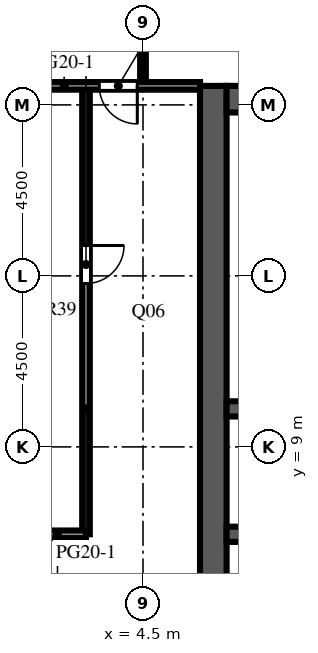
"""IFC4 building model, lengths in metres.
Left out: names, types, materials, properties, quantities, classifications, styles, units other than length and angle.
Written with IfcOpenShell. Run it as: python <this file> out.ifc"""

import sys

from ifc_helpers import new_model, si_unit, direction, frame, frame_2d, origin, place, context, subcontext, project, spatial, rectangle, extrude, element, fill, save


model = new_model("IFC4")
c1 = context("Model", 3, precision=1e-05, world=origin(), true_north=direction((0.0, 1.0)))
c2 = subcontext(c1, "Body", "Model", "MODEL_VIEW")
j1 = project(units=[si_unit("LENGTHUNIT", "METRE"), si_unit("PLANEANGLEUNIT", "RADIAN")], contexts=[c1])
p1 = place(None, origin())
s1 = spatial("IfcSite", under=j1, at=p1, CompositionType="ELEMENT")
p2 = place(p1, origin())
s2 = spatial("IfcBuilding", under=s1, at=p2, CompositionType="ELEMENT")
p3 = place(p2, frame((0.0, 0.0, 239.8)))
s3 = spatial("IfcBuildingStorey", under=s2, at=p3, CompositionType="ELEMENT", Elevation=239.8)
p4 = place(p3, frame((6.35, -9.0, 0.0), z_axis=(0.0, 0.0, 1.0), x_axis=(0.0, 1.0, 0.0)))
e1 = element("IfcWall", 1, at=p4, inside=s3, PredefinedType="SHEAR", context=c2, shape_type="SweptSolid", body=[
    extrude(rectangle(XDim=27.5, YDim=0.7, at=frame_2d((13.75, 0.0))), origin(), (0.0, 0.0, 1.0), 4.1),
])
p5 = place(p4, frame((12.55, 0.0, 0.0)))
e2 = element("IfcOpeningElement", 2, at=p5, cuts=e1, PredefinedType="OPENING", context=c2, shape_type="SweptSolid", body=[
    extrude(rectangle(XDim=2.4, YDim=2.4, at=frame_2d((1.2, 1.2))), frame((0.0, 0.36, 0.0), z_axis=(0.0, -1.0, 0.0), x_axis=(1.0, 0.0, 0.0)), (0.0, 0.0, 1.0), 0.72),
])
p6 = place(p4, frame((5.42, 0.0, 0.0)))
e3 = element("IfcOpeningElement", 3, at=p6, cuts=e1, PredefinedType="OPENING", context=c2, shape_type="SweptSolid", body=[
    extrude(rectangle(XDim=1.2, YDim=2.1, at=frame_2d((0.6, 1.05))), frame((0.0, 0.36, 0.0), z_axis=(0.0, -1.0, 0.0), x_axis=(1.0, 0.0, 0.0)), (0.0, 0.0, 1.0), 0.72),
])
p7 = place(p4, frame((19.46, 0.0, 0.0)))
e4 = element("IfcOpeningElement", 4, at=p7, cuts=e1, PredefinedType="OPENING", context=c2, shape_type="SweptSolid", body=[
    extrude(rectangle(XDim=1.0, YDim=2.1, at=frame_2d((0.5, 1.05))), frame((0.0, 0.36, 0.0), z_axis=(0.0, -1.0, 0.0), x_axis=(1.0, 0.0, 0.0)), (0.0, 0.0, 1.0), 0.72),
])
p8 = place(p4, frame((21.17, 0.0, 0.0)))
e5 = element("IfcOpeningElement", 5, at=p8, cuts=e1, PredefinedType="OPENING", context=c2, shape_type="SweptSolid", body=[
    extrude(rectangle(XDim=1.0, YDim=2.1, at=frame_2d((0.5, 1.05))), frame((0.0, 0.36, 0.0), z_axis=(0.0, -1.0, 0.0), x_axis=(1.0, 0.0, 0.0)), (0.0, 0.0, 1.0), 0.72),
])
p9 = place(p4, frame((23.26, 0.0, 0.0)))
e6 = element("IfcOpeningElement", 6, at=p9, cuts=e1, PredefinedType="OPENING", context=c2, shape_type="SweptSolid", body=[
    extrude(rectangle(XDim=1.0, YDim=2.1, at=frame_2d((0.5, 1.05))), frame((0.0, 0.36, 0.0), z_axis=(0.0, -1.0, 0.0), x_axis=(1.0, 0.0, 0.0)), (0.0, 0.0, 1.0), 0.72),
])
p10 = place(p4, frame((25.35, 0.0, 0.0)))
e7 = element("IfcOpeningElement", 7, at=p10, cuts=e1, PredefinedType="OPENING", context=c2, shape_type="SweptSolid", body=[
    extrude(rectangle(XDim=1.0, YDim=2.1, at=frame_2d((0.5, 1.05))), frame((0.0, 0.36, 0.0), z_axis=(0.0, -1.0, 0.0), x_axis=(1.0, 0.0, 0.0)), (0.0, 0.0, 1.0), 0.72),
])
p11 = place(p3, frame((6.7, 18.15, 0.0), z_axis=(0.0, 0.0, 1.0), x_axis=(1.0, 0.0, 0.0)))
e8 = element("IfcWall", 8, at=p11, inside=s3, PredefinedType="SHEAR", context=c2, shape_type="SweptSolid", body=[
    extrude(rectangle(XDim=10.6, YDim=0.7, at=frame_2d((5.3, 0.0))), origin(), (0.0, 0.0, 1.0), 4.1),
])
p12 = place(p3, frame((6.7, 6.7, 0.0), z_axis=(0.0, 0.0, 1.0), x_axis=(1.0, 0.0, 0.0)))
e9 = element("IfcWall", 9, at=p12, inside=s3, PredefinedType="SHEAR", context=c2, shape_type="SweptSolid", body=[
    extrude(rectangle(XDim=10.6, YDim=0.4, at=frame_2d((5.3, 0.0))), origin(), (0.0, 0.0, 1.0), 4.1),
])
p13 = place(p12, frame((3.438, 0.0, 0.0)))
e10 = element("IfcOpeningElement", 10, at=p13, cuts=e9, PredefinedType="OPENING", context=c2, shape_type="SweptSolid", body=[
    extrude(rectangle(XDim=1.1, YDim=2.1, at=frame_2d((0.55, 1.05))), frame((0.0, 0.21, 0.0), z_axis=(0.0, -1.0, 0.0), x_axis=(1.0, 0.0, 0.0)), (0.0, 0.0, 1.0), 0.42),
])
p14 = place(p12, frame((6.062, 0.0, 0.0)))
e11 = element("IfcOpeningElement", 11, at=p14, cuts=e9, PredefinedType="OPENING", context=c2, shape_type="SweptSolid", body=[
    extrude(rectangle(XDim=1.1, YDim=2.1, at=frame_2d((0.55, 1.05))), frame((0.0, 0.21, 0.0), z_axis=(0.0, -1.0, 0.0), x_axis=(1.0, 0.0, 0.0)), (0.0, 0.0, 1.0), 0.42),
])
p15 = place(p12, frame((8.812, 0.0, 0.0)))
e12 = element("IfcOpeningElement", 12, at=p15, cuts=e9, PredefinedType="OPENING", context=c2, shape_type="SweptSolid", body=[
    extrude(rectangle(XDim=1.1, YDim=2.1, at=frame_2d((0.55, 1.05))), frame((0.0, 0.21, 0.0), z_axis=(0.0, -1.0, 0.0), x_axis=(1.0, 0.0, 0.0)), (0.0, 0.0, 1.0), 0.42),
])
p16 = place(p12, frame((0.738, 0.0, 0.0)))
e13 = element("IfcOpeningElement", 13, at=p16, cuts=e9, PredefinedType="OPENING", context=c2, shape_type="SweptSolid", body=[
    extrude(rectangle(XDim=1.0, YDim=2.1, at=frame_2d((0.5, 1.05))), frame((0.0, 0.21, 0.0), z_axis=(0.0, -1.0, 0.0), x_axis=(1.0, 0.0, 0.0)), (0.0, 0.0, 1.0), 0.42),
])
p17 = place(p3, frame((6.7, 10.0, 0.0), z_axis=(0.0, 0.0, 1.0), x_axis=(1.0, 0.0, 0.0)))
e14 = element("IfcWall", 14, at=p17, inside=s3, PredefinedType="SHEAR", context=c2, shape_type="SweptSolid", body=[
    extrude(rectangle(XDim=10.6, YDim=0.4, at=frame_2d((5.3, 0.0))), origin(), (0.0, 0.0, 1.0), 4.1),
])
for number, where, z_axis, x_axis in (
    (15, (6.7, 11.72, 0.0), (0.0, 0.0, 1.0), (1.0, 0.0, 0.0)),
    (16, (6.7, 13.62, 0.0), (0.0, 0.0, 1.0), (1.0, 0.0, 0.0)),
    (17, (6.7, 15.9, 0.0), (0.0, 0.0, 1.0), (1.0, 0.0, 0.0)),
):
    element("IfcWall", number, at=place(p3, frame(where, z_axis=z_axis, x_axis=x_axis)), inside=s3, PredefinedType="PARTITIONING", context=c2, shape_type="SweptSolid", body=[
        extrude(rectangle(XDim=5.1, YDim=0.1, at=frame_2d((2.55, 0.0))), origin(), (0.0, 0.0, 1.0), 3.65),
    ])
p18 = place(p3, frame((3.0, 6.7, 0.0), z_axis=(0.0, 0.0, 1.0), x_axis=(0.0, 1.0, 0.0)))
e18 = element("IfcWall", 18, at=p18, inside=s3, PredefinedType="PARTITIONING", context=c2, shape_type="SweptSolid", body=[
    extrude(rectangle(XDim=11.8, YDim=0.2, at=frame_2d((5.9, 0.0))), origin(), (0.0, 0.0, 1.0), 3.65),
])
p19 = place(p18, frame((6.6, 0.0, 0.0)))
e19 = element("IfcOpeningElement", 19, at=p19, cuts=e18, PredefinedType="OPENING", context=c2, shape_type="SweptSolid", body=[
    extrude(rectangle(XDim=1.0, YDim=2.1, at=frame_2d((0.5, 1.05))), frame((0.0, 0.11, 0.0), z_axis=(0.0, -1.0, 0.0), x_axis=(1.0, 0.0, 0.0)), (0.0, 0.0, 1.0), 0.22),
])
p20 = place(p3, frame((4.5, 31.1, 0.0), z_axis=(0.0, 0.0, 1.0), x_axis=(0.0, -1.0, 0.0)))
e20 = element("IfcWall", 20, at=p20, inside=s3, PredefinedType="PARTITIONING", context=c2, shape_type="SweptSolid", body=[
    extrude(rectangle(XDim=12.6, YDim=0.15, at=frame_2d((6.3, 0.0))), origin(), (0.0, 0.0, 1.0), 3.65),
])
p21 = place(p20, frame((1.7, 0.0, 0.0)))
e21 = element("IfcOpeningElement", 21, at=p21, cuts=e20, PredefinedType="OPENING", context=c2, shape_type="SweptSolid", body=[
    extrude(rectangle(XDim=1.0, YDim=2.1, at=frame_2d((0.5, 1.05))), frame((0.0, 0.085, 0.0), z_axis=(0.0, -1.0, 0.0), x_axis=(1.0, 0.0, 0.0)), (0.0, 0.0, 1.0), 0.17),
])
p22 = place(p3, frame((1.5, 6.7, 0.0), z_axis=(0.0, 0.0, 1.0), x_axis=(1.0, 0.0, 0.0)))
e22 = element("IfcWall", 22, at=p22, inside=s3, PredefinedType="PARTITIONING", context=c2, shape_type="SweptSolid", body=[
    extrude(rectangle(XDim=1.5, YDim=0.2, at=frame_2d((0.75, 0.0))), origin(), (0.0, 0.0, 1.0), 3.65),
])
p23 = place(p3, frame((1.5, 18.5, 0.0), z_axis=(0.0, 0.0, 1.0), x_axis=(1.0, 0.0, 0.0)))
e23 = element("IfcWall", 23, at=p23, inside=s3, PredefinedType="PARTITIONING", context=c2, shape_type="SweptSolid", body=[
    extrude(rectangle(XDim=4.5, YDim=0.2, at=frame_2d((2.25, 0.0))), origin(), (0.0, 0.0, 1.0), 3.65),
])
p24 = place(p23, frame((1.85, 0.0, 0.0)))
e24 = element("IfcOpeningElement", 24, at=p24, cuts=e23, PredefinedType="OPENING", context=c2, shape_type="SweptSolid", body=[
    extrude(rectangle(XDim=1.0, YDim=2.1, at=frame_2d((0.5, 1.05))), frame((0.0, 0.11, 0.0), z_axis=(0.0, -1.0, 0.0), x_axis=(1.0, 0.0, 0.0)), (0.0, 0.0, 1.0), 0.22),
])
p25 = place(p5, origin())
e25 = element("IfcDoor", 25, at=p25, inside=s3, OperationType="DOUBLE_DOOR_DOUBLE_SWING", PredefinedType="DOOR", context=c2, shape_type="SweptSolid", body=[
    extrude(rectangle(XDim=2.4, YDim=2.4, at=frame_2d((1.2, 1.2))), frame((0.0, 0.025, 0.0), z_axis=(0.0, -1.0, 0.0), x_axis=(1.0, 0.0, 0.0)), (0.0, 0.0, 1.0), 0.05),
])
fill(e2, e25)
p26 = place(p7, origin())
e26 = element("IfcDoor", 26, at=p26, inside=s3, OperationType="SINGLE_SWING_RIGHT", PredefinedType="DOOR", context=c2, shape_type="SweptSolid", body=[
    extrude(rectangle(XDim=1.0, YDim=2.1, at=frame_2d((0.5, 1.05))), frame((0.0, -0.275, 0.0), z_axis=(0.0, -1.0, 0.0), x_axis=(1.0, 0.0, 0.0)), (0.0, 0.0, 1.0), 0.05),
])
fill(e4, e26)
p27 = place(p8, origin())
e27 = element("IfcDoor", 27, at=p27, inside=s3, OperationType="SINGLE_SWING_LEFT", PredefinedType="DOOR", context=c2, shape_type="SweptSolid", body=[
    extrude(rectangle(XDim=1.0, YDim=2.1, at=frame_2d((0.5, 1.05))), frame((0.0, -0.275, 0.0), z_axis=(0.0, -1.0, 0.0), x_axis=(1.0, 0.0, 0.0)), (0.0, 0.0, 1.0), 0.05),
])
fill(e5, e27)
p28 = place(p9, origin())
e28 = element("IfcDoor", 28, at=p28, inside=s3, OperationType="SINGLE_SWING_RIGHT", PredefinedType="DOOR", context=c2, shape_type="SweptSolid", body=[
    extrude(rectangle(XDim=1.0, YDim=2.1, at=frame_2d((0.5, 1.05))), frame((0.0, -0.275, 0.0), z_axis=(0.0, -1.0, 0.0), x_axis=(1.0, 0.0, 0.0)), (0.0, 0.0, 1.0), 0.05),
])
fill(e6, e28)
p29 = place(p10, origin())
e29 = element("IfcDoor", 29, at=p29, inside=s3, OperationType="SINGLE_SWING_LEFT", PredefinedType="DOOR", context=c2, shape_type="SweptSolid", body=[
    extrude(rectangle(XDim=1.0, YDim=2.1, at=frame_2d((0.5, 1.05))), frame((0.0, -0.275, 0.0), z_axis=(0.0, -1.0, 0.0), x_axis=(1.0, 0.0, 0.0)), (0.0, 0.0, 1.0), 0.05),
])
fill(e7, e29)
p30 = place(p19, origin())
e30 = element("IfcDoor", 30, at=p30, inside=s3, OperationType="SINGLE_SWING_RIGHT", PredefinedType="DOOR", context=c2, shape_type="SweptSolid", body=[
    extrude(rectangle(XDim=1.0, YDim=2.1, at=frame_2d((0.5, 1.05))), frame((0.0, 0.025, 0.0), z_axis=(0.0, -1.0, 0.0), x_axis=(1.0, 0.0, 0.0)), (0.0, 0.0, 1.0), 0.05),
])
fill(e19, e30)
p31 = place(p24, origin())
e31 = element("IfcDoor", 31, at=p31, inside=s3, OperationType="SINGLE_SWING_RIGHT", PredefinedType="DOOR", context=c2, shape_type="SweptSolid", body=[
    extrude(rectangle(XDim=1.0, YDim=2.1, at=frame_2d((0.5, 1.05))), frame((0.0, 0.025, 0.0), z_axis=(0.0, -1.0, 0.0), x_axis=(1.0, 0.0, 0.0)), (0.0, 0.0, 1.0), 0.05),
])
fill(e24, e31)
save(model, sys.argv[1])
